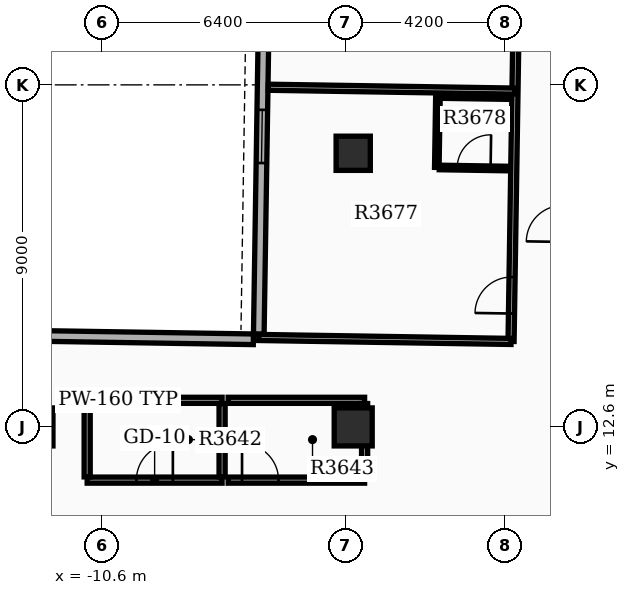
"""IFC4 building model, lengths in metres.
Left out: names, types, materials, properties, quantities, classifications, styles, units other than length and angle.
Written with IfcOpenShell. Run it as: python <this file> out.ifc"""

import sys

from ifc_helpers import new_model, si_unit, direction, frame, frame_2d, origin, origin_2d, place, context, subcontext, project, spatial, rectangle, extrude, element, fill, save


model = new_model("IFC4")
c1 = context("Model", 3, precision=1e-05, world=origin(), true_north=direction((0.0, 1.0)))
c2 = subcontext(c1, "Body", "Model", "MODEL_VIEW")
j1 = project(units=[si_unit("LENGTHUNIT", "METRE"), si_unit("PLANEANGLEUNIT", "RADIAN")], contexts=[c1])
p1 = place(None, origin())
s1 = spatial("IfcSite", under=j1, at=p1, CompositionType="ELEMENT")
p2 = place(p1, origin())
s2 = spatial("IfcBuilding", under=s1, at=p2, CompositionType="ELEMENT")
p3 = place(p2, frame((0.0, 0.0, 228.6)))
s3 = spatial("IfcBuildingStorey", under=s2, at=p3, CompositionType="ELEMENT", Elevation=228.6)
for number, where, z_axis, x_axis in (
    (1, (-12.4, 12.6, 0.0), (0.0, 0.0, 1.0), (1.0, 0.0, 0.0)),
    (2, (-4.0, 12.6, 0.0), (0.0, 0.0, 1.0), (1.0, 0.0, 0.0)),
):
    element("IfcColumn", number, at=place(p3, frame(where, z_axis=z_axis, x_axis=x_axis)), inside=s3, PredefinedType="COLUMN", context=c2, shape_type="SweptSolid", body=[
        extrude(rectangle(XDim=1.0, YDim=1.0, at=origin_2d()), origin(), (0.0, 0.0, 1.0), 3.9),
    ])
p4 = place(p3, frame((-4.0, 19.8, 0.0), z_axis=(0.0, 0.0, 1.0), x_axis=(1.0, 0.0, 0.0)))
e3 = element("IfcColumn", 3, at=p4, inside=s3, PredefinedType="COLUMN", context=c2, shape_type="SweptSolid", body=[
    extrude(rectangle(XDim=0.9, YDim=0.9, at=origin_2d()), origin(), (0.0, 0.0, 1.0), 3.9),
])
p5 = place(p3, frame((-6.169, 35.141, 0.0), z_axis=(0.0, 0.0, 1.0), x_axis=(-0.01571739401, -0.999876474133, 0.0)))
e4 = element("IfcWall", 4, at=p5, inside=s3, PredefinedType="STANDARD", context=c2, shape_type="SweptSolid", body=[
    extrude(rectangle(XDim=20.1, YDim=0.28, at=frame_2d((10.05, 0.0))), origin(), (0.0, 0.0, 1.0), 3.18),
])
p6 = place(p5, frame((1.6, 0.0, 0.8)))
e5 = element("IfcOpeningElement", 5, at=p6, cuts=e4, PredefinedType="OPENING", context=c2, shape_type="SweptSolid", body=[
    extrude(rectangle(XDim=1.4, YDim=1.6, at=frame_2d((0.7, 0.8))), frame((0.0, 0.15, 0.0), z_axis=(0.0, -1.0, 0.0), x_axis=(1.0, 0.0, 0.0)), (0.0, 0.0, 1.0), 0.3),
])
p7 = place(p5, frame((7.05, 0.0, 0.8)))
e6 = element("IfcOpeningElement", 6, at=p7, cuts=e4, PredefinedType="OPENING", context=c2, shape_type="SweptSolid", body=[
    extrude(rectangle(XDim=1.4, YDim=1.6, at=frame_2d((0.7, 0.8))), frame((0.0, 0.15, 0.0), z_axis=(0.0, -1.0, 0.0), x_axis=(1.0, 0.0, 0.0)), (0.0, 0.0, 1.0), 0.3),
])
p8 = place(p5, frame((10.25, 0.0, 0.8)))
e7 = element("IfcOpeningElement", 7, at=p8, cuts=e4, PredefinedType="OPENING", context=c2, shape_type="SweptSolid", body=[
    extrude(rectangle(XDim=1.4, YDim=1.6, at=frame_2d((0.7, 0.8))), frame((0.0, 0.15, 0.0), z_axis=(0.0, -1.0, 0.0), x_axis=(1.0, 0.0, 0.0)), (0.0, 0.0, 1.0), 0.3),
])
p9 = place(p5, frame((14.2, 0.0, 0.8)))
e8 = element("IfcOpeningElement", 8, at=p9, cuts=e4, PredefinedType="OPENING", context=c2, shape_type="SweptSolid", body=[
    extrude(rectangle(XDim=1.4, YDim=1.6, at=frame_2d((0.7, 0.8))), frame((0.0, 0.15, 0.0), z_axis=(0.0, -1.0, 0.0), x_axis=(1.0, 0.0, 0.0)), (0.0, 0.0, 1.0), 0.3),
])
p10 = place(p3, frame((-12.926, 15.005, 0.0), z_axis=(0.0, 0.0, 1.0), x_axis=(0.999876823822, -0.015695132501, 0.0)))
e9 = element("IfcWall", 9, at=p10, inside=s3, PredefinedType="STANDARD", context=c2, shape_type="SweptSolid", body=[
    extrude(rectangle(XDim=6.3, YDim=0.28, at=frame_2d((3.15, 0.0))), origin(), (0.0, 0.0, 1.0), 3.18),
])
p11 = place(p3, frame((-11.0, 11.2, 0.0), z_axis=(0.0, 0.0, 1.0), x_axis=(1.0, 0.0, 0.0)))
e10 = element("IfcWall", 10, at=p11, inside=s3, PredefinedType="PARTITIONING", context=c2, shape_type="SweptSolid", body=[
    extrude(rectangle(XDim=3.55, YDim=0.16, at=frame_2d((1.775, 0.0))), origin(), (0.0, 0.0, 1.0), 3.17),
])
p12 = place(p11, frame((1.295, 0.0, 0.0)))
e11 = element("IfcOpeningElement", 11, at=p12, cuts=e10, PredefinedType="OPENING", context=c2, shape_type="SweptSolid", body=[
    extrude(rectangle(XDim=0.96, YDim=2.15, at=frame_2d((0.48, 1.075))), frame((0.0, 0.09, 0.0), z_axis=(0.0, -1.0, 0.0), x_axis=(1.0, 0.0, 0.0)), (0.0, 0.0, 1.0), 0.18),
])
p13 = place(p3, frame((-11.0, 13.3, 0.0), z_axis=(0.0, 0.0, 1.0), x_axis=(1.0, 0.0, 0.0)))
e12 = element("IfcWall", 12, at=p13, inside=s3, PredefinedType="PARTITIONING", context=c2, shape_type="SweptSolid", body=[
    extrude(rectangle(XDim=3.55, YDim=0.16, at=frame_2d((1.775, 0.0))), origin(), (0.0, 0.0, 1.0), 3.17),
])
for number, where, z_axis, x_axis in (
    (13, (-11.0, 11.285, 0.0), (0.0, 0.0, 1.0), (0.0, 1.0, 0.0)),
    (14, (-7.45, 11.285, 0.0), (0.0, 0.0, 1.0), (0.0, 1.0, 0.0)),
):
    element("IfcWall", number, at=place(p3, frame(where, z_axis=z_axis, x_axis=x_axis)), inside=s3, PredefinedType="PARTITIONING", context=c2, shape_type="SweptSolid", body=[
        extrude(rectangle(XDim=1.93, YDim=0.16, at=frame_2d((0.965, 0.0))), origin(), (0.0, 0.0, 1.0), 3.17),
    ])
p14 = place(p3, frame((-7.29, 11.2, 0.0), z_axis=(0.0, 0.0, 1.0), x_axis=(1.0, 0.0, 0.0)))
e15 = element("IfcWall", 15, at=p14, inside=s3, PredefinedType="PARTITIONING", context=c2, shape_type="SweptSolid", body=[
    extrude(rectangle(XDim=3.59, YDim=0.16, at=frame_2d((1.795, 0.0))), origin(), (0.0, 0.0, 1.0), 3.17),
])
p15 = place(p14, frame((0.365, 0.0, 0.0)))
e16 = element("IfcOpeningElement", 16, at=p15, cuts=e15, PredefinedType="OPENING", context=c2, shape_type="SweptSolid", body=[
    extrude(rectangle(XDim=0.96, YDim=2.15, at=frame_2d((0.48, 1.075))), frame((0.0, 0.09, 0.0), z_axis=(0.0, -1.0, 0.0), x_axis=(1.0, 0.0, 0.0)), (0.0, 0.0, 1.0), 0.18),
])
p16 = place(p3, frame((-7.29, 13.3, 0.0), z_axis=(0.0, 0.0, 1.0), x_axis=(1.0, 0.0, 0.0)))
e17 = element("IfcWall", 17, at=p16, inside=s3, PredefinedType="PARTITIONING", context=c2, shape_type="SweptSolid", body=[
    extrude(rectangle(XDim=3.59, YDim=0.16, at=frame_2d((1.795, 0.0))), origin(), (0.0, 0.0, 1.0), 3.17),
])
p17 = place(p3, frame((-3.7, 11.285, 0.0), z_axis=(0.0, 0.0, 1.0), x_axis=(0.0, 1.0, 0.0)))
e18 = element("IfcWall", 18, at=p17, inside=s3, PredefinedType="PARTITIONING", context=c2, shape_type="SweptSolid", body=[
    extrude(rectangle(XDim=1.93, YDim=0.16, at=frame_2d((0.965, 0.0))), origin(), (0.0, 0.0, 1.0), 3.17),
])
p18 = place(p3, frame((0.153, 14.849, 0.0), z_axis=(0.0, 0.0, 1.0), x_axis=(0.015701893165, 0.999876717676, 0.0)))
e19 = element("IfcWall", 19, at=p18, inside=s3, PredefinedType="PARTITIONING", context=c2, shape_type="SweptSolid", body=[
    extrude(rectangle(XDim=20.182, YDim=0.16, at=frame_2d((10.091, 0.0))), origin(), (0.0, 0.0, 1.0), 3.17),
])
p19 = place(p18, frame((0.734, 0.0, 0.0)))
e20 = element("IfcOpeningElement", 20, at=p19, cuts=e19, PredefinedType="OPENING", context=c2, shape_type="SweptSolid", body=[
    extrude(rectangle(XDim=0.96, YDim=2.15, at=frame_2d((0.48, 1.075))), frame((0.0, 0.09, 0.0), z_axis=(0.0, -1.0, 0.0), x_axis=(1.0, 0.0, 0.0)), (0.0, 0.0, 1.0), 0.18),
])
p20 = place(p18, frame((7.924, 0.0, 0.0)))
e21 = element("IfcOpeningElement", 21, at=p20, cuts=e19, PredefinedType="OPENING", context=c2, shape_type="SweptSolid", body=[
    extrude(rectangle(XDim=0.96, YDim=2.15, at=frame_2d((0.48, 1.075))), frame((0.0, 0.09, 0.0), z_axis=(0.0, -1.0, 0.0), x_axis=(1.0, 0.0, 0.0)), (0.0, 0.0, 1.0), 0.18),
])
p21 = place(p18, frame((16.614, 0.0, 0.0)))
e22 = element("IfcOpeningElement", 22, at=p21, cuts=e19, PredefinedType="OPENING", context=c2, shape_type="SweptSolid", body=[
    extrude(rectangle(XDim=0.96, YDim=2.15, at=frame_2d((0.48, 1.075))), frame((0.0, 0.09, 0.0), z_axis=(0.0, -1.0, 0.0), x_axis=(1.0, 0.0, 0.0)), (0.0, 0.0, 1.0), 0.18),
])
p22 = place(p3, frame((0.153, 14.849, 0.0), z_axis=(0.0, 0.0, 1.0), x_axis=(-0.999876746497, 0.015700057761, 0.0)))
e23 = element("IfcWall", 23, at=p22, inside=s3, PredefinedType="PARTITIONING", context=c2, shape_type="SweptSolid", body=[
    extrude(rectangle(XDim=6.64, YDim=0.16, at=frame_2d((3.32, 0.0))), origin(), (0.0, 0.0, 1.0), 3.17),
])
p23 = place(p3, frame((0.257, 21.436, 0.0), z_axis=(0.0, 0.0, 1.0), x_axis=(-0.999876442039, 0.015719435564, 0.0)))
e24 = element("IfcWall", 24, at=p23, inside=s3, PredefinedType="PARTITIONING", context=c2, shape_type="SweptSolid", body=[
    extrude(rectangle(XDim=6.492, YDim=0.16, at=frame_2d((3.246, 0.0))), origin(), (0.0, 0.0, 1.0), 3.17),
])
p24 = place(p3, frame((-1.735, 19.427, 0.0), z_axis=(0.0, 0.0, 1.0), x_axis=(0.999878932289, -0.015560230231, 0.0)))
e25 = element("IfcWall", 25, at=p24, inside=s3, PredefinedType="PARTITIONING", context=c2, shape_type="SweptSolid", body=[
    extrude(rectangle(XDim=1.82, YDim=0.12, at=frame_2d((0.91, 0.0))), origin(), (0.0, 0.0, 1.0), 3.17),
])
p25 = place(p24, frame((0.47, 0.0, 0.0)))
e26 = element("IfcOpeningElement", 26, at=p25, cuts=e25, PredefinedType="OPENING", context=c2, shape_type="SweptSolid", body=[
    extrude(rectangle(XDim=0.88, YDim=2.1, at=frame_2d((0.44, 1.05))), frame((0.0, 0.07, 0.0), z_axis=(0.0, -1.0, 0.0), x_axis=(1.0, 0.0, 0.0)), (0.0, 0.0, 1.0), 0.14),
])
p26 = place(p3, frame((-1.706, 21.306, 0.0), z_axis=(0.0, 0.0, 1.0), x_axis=(0.999876836305, -0.015694337248, 0.0)))
e27 = element("IfcWall", 27, at=p26, inside=s3, PredefinedType="PARTITIONING", context=c2, shape_type="SweptSolid", body=[
    extrude(rectangle(XDim=1.82, YDim=0.12, at=frame_2d((0.91, 0.0))), origin(), (0.0, 0.0, 1.0), 3.17),
])
p27 = place(p3, frame((-1.8, 19.428, 0.0), z_axis=(0.0, 0.0, 1.0), x_axis=(0.015714386166, 0.99987652141, 0.0)))
e28 = element("IfcWall", 28, at=p27, inside=s3, PredefinedType="PARTITIONING", context=c2, shape_type="SweptSolid", body=[
    extrude(rectangle(XDim=1.88, YDim=0.12, at=frame_2d((0.94, 0.0))), origin(), (0.0, 0.0, 1.0), 3.17),
])
p28 = place(p9, origin())
e29 = element("IfcWindow", 29, at=p28, inside=s3, PartitioningType="SINGLE_PANEL", PredefinedType="WINDOW", context=c2, shape_type="SweptSolid", body=[
    extrude(rectangle(XDim=1.4, YDim=1.6, at=frame_2d((0.7, 0.8))), frame((0.0, 0.03, 0.0), z_axis=(0.0, -1.0, 0.0), x_axis=(1.0, 0.0, 0.0)), (0.0, 0.0, 1.0), 0.06),
])
fill(e8, e29)
p29 = place(p12, origin())
e30 = element("IfcDoor", 30, at=p29, inside=s3, OperationType="SINGLE_SWING_RIGHT", PredefinedType="DOOR", context=c2, shape_type="SweptSolid", body=[
    extrude(rectangle(XDim=0.96, YDim=2.15, at=frame_2d((0.48, 1.075))), frame((0.0, 0.025, 0.0), z_axis=(0.0, -1.0, 0.0), x_axis=(1.0, 0.0, 0.0)), (0.0, 0.0, 1.0), 0.05),
])
fill(e11, e30)
p30 = place(p15, origin())
e31 = element("IfcDoor", 31, at=p30, inside=s3, OperationType="SINGLE_SWING_LEFT", PredefinedType="DOOR", context=c2, shape_type="SweptSolid", body=[
    extrude(rectangle(XDim=0.96, YDim=2.15, at=frame_2d((0.48, 1.075))), frame((0.0, 0.025, 0.0), z_axis=(0.0, -1.0, 0.0), x_axis=(1.0, 0.0, 0.0)), (0.0, 0.0, 1.0), 0.05),
])
fill(e16, e31)
p31 = place(p19, origin())
e32 = element("IfcDoor", 32, at=p31, inside=s3, OperationType="SINGLE_SWING_LEFT", PredefinedType="DOOR", context=c2, shape_type="SweptSolid", body=[
    extrude(rectangle(XDim=0.96, YDim=2.15, at=frame_2d((0.48, 1.075))), frame((0.0, 0.025, 0.0), z_axis=(0.0, -1.0, 0.0), x_axis=(1.0, 0.0, 0.0)), (0.0, 0.0, 1.0), 0.05),
])
fill(e20, e32)
p32 = place(p25, origin())
e33 = element("IfcDoor", 33, at=p32, inside=s3, OperationType="SINGLE_SWING_RIGHT", PredefinedType="DOOR", context=c2, shape_type="SweptSolid", body=[
    extrude(rectangle(XDim=0.88, YDim=2.1, at=frame_2d((0.44, 1.05))), frame((0.0, 0.025, 0.0), z_axis=(0.0, -1.0, 0.0), x_axis=(1.0, 0.0, 0.0)), (0.0, 0.0, 1.0), 0.05),
])
fill(e26, e33)
save(model, sys.argv[1])
